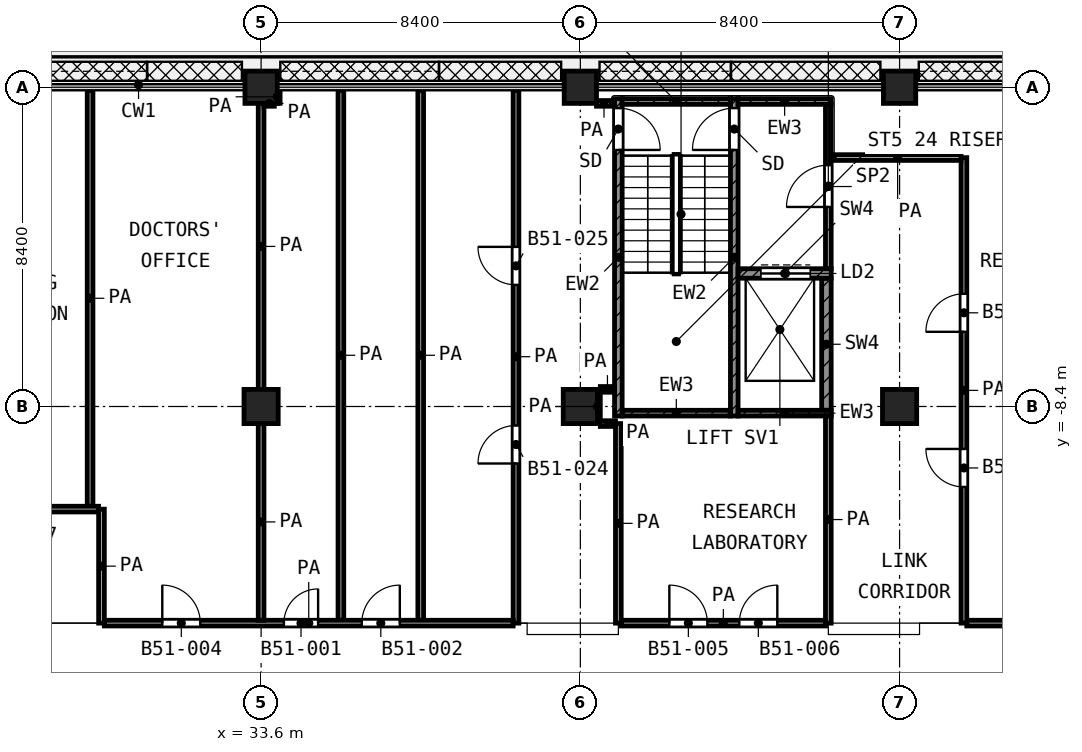
"""IFC4 building model, lengths in metres.
Left out: names, types, materials, properties, quantities, classifications, styles, units other than length and angle.
Written with IfcOpenShell. Run it as: python <this file> out.ifc"""

import sys

from ifc_helpers import new_model, si_unit, direction, frame, frame_2d, origin, origin_2d, place, context, subcontext, project, spatial, rectangle, extrude, element, fill, save


model = new_model("IFC4")
c1 = context("Model", 3, precision=1e-05, world=origin(), true_north=direction((0.0, 1.0)))
c2 = subcontext(c1, "Body", "Model", "MODEL_VIEW")
j1 = project(units=[si_unit("LENGTHUNIT", "METRE"), si_unit("PLANEANGLEUNIT", "RADIAN")], contexts=[c1])
p1 = place(None, origin())
s1 = spatial("IfcSite", under=j1, at=p1, CompositionType="ELEMENT")
p2 = place(p1, origin())
s2 = spatial("IfcBuilding", under=s1, at=p2, CompositionType="ELEMENT")
p3 = place(p2, frame((0.0, 0.0, 222.2)))
s3 = spatial("IfcBuildingStorey", under=s2, at=p3, CompositionType="ELEMENT", Elevation=222.2)
for number, where, z_axis, x_axis in (
    (1, (33.6, 0.0, 0.0), (0.0, 0.0, 1.0), (1.0, 0.0, 0.0)),
    (2, (42.0, 0.0, 0.0), (0.0, 0.0, 1.0), (1.0, 0.0, 0.0)),
    (3, (50.4, 0.0, 0.0), (0.0, 0.0, 1.0), (1.0, 0.0, 0.0)),
):
    element("IfcColumn", number, at=place(p3, frame(where, z_axis=z_axis, x_axis=x_axis)), inside=s3, PredefinedType="COLUMN", context=c2, shape_type="SweptSolid", body=[
        extrude(rectangle(XDim=0.85, YDim=0.85, at=origin_2d()), origin(), (0.0, 0.0, 1.0), 4.2),
    ])
for number, where, z_axis, x_axis in (
    (4, (33.6, -8.4, 0.0), (0.0, 0.0, 1.0), (1.0, 0.0, 0.0)),
    (5, (42.0, -8.4, 0.0), (0.0, 0.0, 1.0), (1.0, 0.0, 0.0)),
    (6, (50.4, -8.4, 0.0), (0.0, 0.0, 1.0), (1.0, 0.0, 0.0)),
):
    element("IfcColumn", number, at=place(p3, frame(where, z_axis=z_axis, x_axis=x_axis)), inside=s3, PredefinedType="COLUMN", context=c2, shape_type="SweptSolid", body=[
        extrude(rectangle(XDim=0.9, YDim=0.9, at=origin_2d()), origin(), (0.0, 0.0, 1.0), 4.2),
    ])
p4 = place(p3, frame((43.0, -8.65, 0.0), z_axis=(0.0, 0.0, 1.0), x_axis=(0.0, 1.0, 0.0)))
e7 = element("IfcWall", 7, at=p4, inside=s3, PredefinedType="SHEAR", context=c2, shape_type="SweptSolid", body=[
    extrude(rectangle(XDim=8.35, YDim=0.2, at=frame_2d((4.175, 0.0))), origin(), (0.0, 0.0, 1.0), 3.6),
])
p5 = place(p4, frame((7.0, 0.0, 0.0)))
e8 = element("IfcOpeningElement", 8, at=p5, cuts=e7, PredefinedType="OPENING", context=c2, shape_type="SweptSolid", body=[
    extrude(rectangle(XDim=1.1, YDim=2.1, at=frame_2d((0.55, 1.05))), frame((0.0, 0.11, 0.0), z_axis=(0.0, -1.0, 0.0), x_axis=(1.0, 0.0, 0.0)), (0.0, 0.0, 1.0), 0.22),
])
p6 = place(p3, frame((46.05, -8.65, 0.0), z_axis=(0.0, 0.0, 1.0), x_axis=(0.0, 1.0, 0.0)))
e9 = element("IfcWall", 9, at=p6, inside=s3, PredefinedType="SHEAR", context=c2, shape_type="SweptSolid", body=[
    extrude(rectangle(XDim=8.35, YDim=0.2, at=frame_2d((4.175, 0.0))), origin(), (0.0, 0.0, 1.0), 3.6),
])
p7 = place(p6, frame((7.0, 0.0, 0.0)))
e10 = element("IfcOpeningElement", 10, at=p7, cuts=e9, PredefinedType="OPENING", context=c2, shape_type="SweptSolid", body=[
    extrude(rectangle(XDim=1.1, YDim=2.1, at=frame_2d((0.55, 1.05))), frame((0.0, 0.11, 0.0), z_axis=(0.0, -1.0, 0.0), x_axis=(1.0, 0.0, 0.0)), (0.0, 0.0, 1.0), 0.22),
])
p8 = place(p3, frame((43.1, -0.375, 0.0), z_axis=(0.0, 0.0, 1.0), x_axis=(1.0, 0.0, 0.0)))
e11 = element("IfcWall", 11, at=p8, inside=s3, PredefinedType="SHEAR", context=c2, shape_type="SweptSolid", body=[
    extrude(rectangle(XDim=2.85, YDim=0.15, at=frame_2d((1.425, 0.0))), origin(), (0.0, 0.0, 1.0), 3.6),
])
p9 = place(p3, frame((46.15, -0.375, 0.0), z_axis=(0.0, 0.0, 1.0), x_axis=(1.0, 0.0, 0.0)))
e12 = element("IfcWall", 12, at=p9, inside=s3, PredefinedType="SHEAR", context=c2, shape_type="SweptSolid", body=[
    extrude(rectangle(XDim=2.45, YDim=0.15, at=frame_2d((1.225, 0.0))), origin(), (0.0, 0.0, 1.0), 3.6),
])
p10 = place(p3, frame((43.1, -8.575, 0.0), z_axis=(0.0, 0.0, 1.0), x_axis=(1.0, 0.0, 0.0)))
e13 = element("IfcWall", 13, at=p10, inside=s3, PredefinedType="SHEAR", context=c2, shape_type="SweptSolid", body=[
    extrude(rectangle(XDim=2.85, YDim=0.15, at=frame_2d((1.425, 0.0))), origin(), (0.0, 0.0, 1.0), 3.6),
])
p11 = place(p3, frame((46.15, -8.575, 0.0), z_axis=(0.0, 0.0, 1.0), x_axis=(1.0, 0.0, 0.0)))
e14 = element("IfcWall", 14, at=p11, inside=s3, PredefinedType="SHEAR", context=c2, shape_type="SweptSolid", body=[
    extrude(rectangle(XDim=2.45, YDim=0.15, at=frame_2d((1.225, 0.0))), origin(), (0.0, 0.0, 1.0), 3.6),
])
p12 = place(p3, frame((46.15, -4.9, 0.0), z_axis=(0.0, 0.0, 1.0), x_axis=(1.0, 0.0, 0.0)))
e15 = element("IfcWall", 15, at=p12, inside=s3, PredefinedType="SHEAR", context=c2, shape_type="SweptSolid", body=[
    extrude(rectangle(XDim=2.45, YDim=0.25, at=frame_2d((1.225, 0.0))), origin(), (0.0, 0.0, 1.0), 3.6),
])
p13 = place(p12, frame((0.6, 0.0, 0.0)))
e16 = element("IfcOpeningElement", 16, at=p13, cuts=e15, PredefinedType="OPENING", context=c2, shape_type="SweptSolid", body=[
    extrude(rectangle(XDim=1.3, YDim=2.1, at=frame_2d((0.65, 1.05))), frame((0.0, 0.135, 0.0), z_axis=(0.0, -1.0, 0.0), x_axis=(1.0, 0.0, 0.0)), (0.0, 0.0, 1.0), 0.27),
])
p14 = place(p3, frame((48.475, -8.5, 0.0), z_axis=(0.0, 0.0, 1.0), x_axis=(0.0, 1.0, 0.0)))
e17 = element("IfcWall", 17, at=p14, inside=s3, PredefinedType="SHEAR", context=c2, shape_type="SweptSolid", body=[
    extrude(rectangle(XDim=3.475, YDim=0.25, at=frame_2d((1.738, 0.0))), origin(), (0.0, 0.0, 1.0), 3.6),
])
p15 = place(p3, frame((48.525, -4.775, 0.0), z_axis=(0.0, 0.0, 1.0), x_axis=(0.0, 1.0, 0.0)))
e18 = element("IfcWall", 18, at=p15, inside=s3, PredefinedType="PARTITIONING", context=c2, shape_type="SweptSolid", body=[
    extrude(rectangle(XDim=4.325, YDim=0.15, at=frame_2d((2.163, 0.0))), origin(), (0.0, 0.0, 1.0), 3.6),
])
p16 = place(p15, frame((1.625, 0.0, 0.0)))
e19 = element("IfcOpeningElement", 19, at=p16, cuts=e18, PredefinedType="OPENING", context=c2, shape_type="SweptSolid", body=[
    extrude(rectangle(XDim=1.1, YDim=2.1, at=frame_2d((0.55, 1.05))), frame((0.0, 0.085, 0.0), z_axis=(0.0, -1.0, 0.0), x_axis=(1.0, 0.0, 0.0)), (0.0, 0.0, 1.0), 0.17),
])
p17 = place(p3, frame((29.475, -14.1, 0.0), z_axis=(0.0, 0.0, 1.0), x_axis=(1.0, 0.0, 0.0)))
e20 = element("IfcWall", 20, at=p17, inside=s3, PredefinedType="PARTITIONING", context=c2, shape_type="SweptSolid", body=[
    extrude(rectangle(XDim=10.757, YDim=0.15, at=frame_2d((5.378, 0.0))), origin(), (0.0, 0.0, 1.0), 3.6),
])
p18 = place(p17, frame((1.525, 0.0, 0.0)))
e21 = element("IfcOpeningElement", 21, at=p18, cuts=e20, PredefinedType="OPENING", context=c2, shape_type="SweptSolid", body=[
    extrude(rectangle(XDim=1.0, YDim=2.1, at=frame_2d((0.5, 1.05))), frame((0.0, 0.085, 0.0), z_axis=(0.0, -1.0, 0.0), x_axis=(1.0, 0.0, 0.0)), (0.0, 0.0, 1.0), 0.17),
])
p19 = place(p17, frame((4.725, 0.0, 0.0)))
e22 = element("IfcOpeningElement", 22, at=p19, cuts=e20, PredefinedType="OPENING", context=c2, shape_type="SweptSolid", body=[
    extrude(rectangle(XDim=0.9, YDim=2.1, at=frame_2d((0.45, 1.05))), frame((0.0, 0.085, 0.0), z_axis=(0.0, -1.0, 0.0), x_axis=(1.0, 0.0, 0.0)), (0.0, 0.0, 1.0), 0.17),
])
p20 = place(p17, frame((6.775, 0.0, 0.0)))
e23 = element("IfcOpeningElement", 23, at=p20, cuts=e20, PredefinedType="OPENING", context=c2, shape_type="SweptSolid", body=[
    extrude(rectangle(XDim=1.0, YDim=2.1, at=frame_2d((0.5, 1.05))), frame((0.0, 0.085, 0.0), z_axis=(0.0, -1.0, 0.0), x_axis=(1.0, 0.0, 0.0)), (0.0, 0.0, 1.0), 0.17),
])
p21 = place(p3, frame((43.075, -14.1, 0.0), z_axis=(0.0, 0.0, 1.0), x_axis=(1.0, 0.0, 0.0)))
e24 = element("IfcWall", 24, at=p21, inside=s3, PredefinedType="PARTITIONING", context=c2, shape_type="SweptSolid", body=[
    extrude(rectangle(XDim=5.375, YDim=0.15, at=frame_2d((2.688, 0.0))), origin(), (0.0, 0.0, 1.0), 3.6),
])
p22 = place(p21, frame((1.267, 0.0, 0.0)))
e25 = element("IfcOpeningElement", 25, at=p22, cuts=e24, PredefinedType="OPENING", context=c2, shape_type="SweptSolid", body=[
    extrude(rectangle(XDim=1.0, YDim=2.1, at=frame_2d((0.5, 1.05))), frame((0.0, 0.085, 0.0), z_axis=(0.0, -1.0, 0.0), x_axis=(1.0, 0.0, 0.0)), (0.0, 0.0, 1.0), 0.17),
])
p23 = place(p21, frame((3.108, 0.0, 0.0)))
e26 = element("IfcOpeningElement", 26, at=p23, cuts=e24, PredefinedType="OPENING", context=c2, shape_type="SweptSolid", body=[
    extrude(rectangle(XDim=1.0, YDim=2.1, at=frame_2d((0.5, 1.05))), frame((0.0, 0.085, 0.0), z_axis=(0.0, -1.0, 0.0), x_axis=(1.0, 0.0, 0.0)), (0.0, 0.0, 1.0), 0.17),
])
p24 = place(p3, frame((52.168, -14.1, 0.0), z_axis=(0.0, 0.0, 1.0), x_axis=(1.0, 0.0, 0.0)))
e27 = element("IfcWall", 27, at=p24, inside=s3, PredefinedType="PARTITIONING", context=c2, shape_type="SweptSolid", body=[
    extrude(rectangle(XDim=14.952, YDim=0.15, at=frame_2d((7.476, 0.0))), origin(), (0.0, 0.0, 1.0), 2.7),
])
p25 = place(p24, frame((8.932, 0.0, 0.0)))
e28 = element("IfcOpeningElement", 28, at=p25, cuts=e27, PredefinedType="OPENING", context=c2, shape_type="SweptSolid", body=[
    extrude(rectangle(XDim=1.0, YDim=2.1, at=frame_2d((0.5, 1.05))), frame((0.0, 0.085, 0.0), z_axis=(0.0, -1.0, 0.0), x_axis=(1.0, 0.0, 0.0)), (0.0, 0.0, 1.0), 0.17),
])
p26 = place(p24, frame((11.732, 0.0, 0.0)))
e29 = element("IfcOpeningElement", 29, at=p26, cuts=e27, PredefinedType="OPENING", context=c2, shape_type="SweptSolid", body=[
    extrude(rectangle(XDim=1.0, YDim=2.1, at=frame_2d((0.5, 1.05))), frame((0.0, 0.085, 0.0), z_axis=(0.0, -1.0, 0.0), x_axis=(1.0, 0.0, 0.0)), (0.0, 0.0, 1.0), 0.17),
])
p27 = place(p3, frame((24.8, -11.1, 0.0), z_axis=(0.0, 0.0, 1.0), x_axis=(1.0, 0.0, 0.0)))
e30 = element("IfcWall", 30, at=p27, inside=s3, PredefinedType="PARTITIONING", context=c2, shape_type="SweptSolid", body=[
    extrude(rectangle(XDim=4.523, YDim=0.15, at=frame_2d((2.261, 0.0))), origin(), (0.0, 0.0, 1.0), 3.6),
])
p28 = place(p27, frame((1.75, 0.0, 0.0)))
e31 = element("IfcOpeningElement", 31, at=p28, cuts=e30, PredefinedType="OPENING", context=c2, shape_type="SweptSolid", body=[
    extrude(rectangle(XDim=1.2, YDim=2.1, at=frame_2d((0.6, 1.05))), frame((0.0, 0.085, 0.0), z_axis=(0.0, -1.0, 0.0), x_axis=(1.0, 0.0, 0.0)), (0.0, 0.0, 1.0), 0.17),
])
p29 = place(p3, frame((42.525, -8.85, 0.0), z_axis=(0.0, 0.0, 1.0), x_axis=(1.0, 0.0, 0.0)))
e32 = element("IfcWall", 32, at=p29, inside=s3, PredefinedType="PARTITIONING", context=c2, shape_type="SweptSolid", body=[
    extrude(rectangle(XDim=0.4, YDim=0.15, at=frame_2d((0.2, 0.0))), origin(), (0.0, 0.0, 1.0), 3.6),
])
p30 = place(p3, frame((42.526, -7.95, 0.0), z_axis=(0.0, 0.0, 1.0), x_axis=(1.0, 0.0, 0.0)))
e33 = element("IfcWall", 33, at=p30, inside=s3, PredefinedType="PARTITIONING", context=c2, shape_type="SweptSolid", body=[
    extrude(rectangle(XDim=0.374, YDim=0.15, at=frame_2d((0.187, 0.0))), origin(), (0.0, 0.0, 1.0), 3.6),
])
p31 = place(p3, frame((48.68, -1.85, 0.0), z_axis=(0.0, 0.0, 1.0), x_axis=(1.0, 0.0, 0.0)))
e34 = element("IfcWall", 34, at=p31, inside=s3, PredefinedType="PARTITIONING", context=c2, shape_type="SweptSolid", body=[
    extrude(rectangle(XDim=3.337, YDim=0.15, at=frame_2d((1.668, 0.0))), origin(), (0.0, 0.0, 1.0), 3.6),
])
p32 = place(p3, frame((33.677, -0.425, 0.0), z_axis=(0.0, 0.0, 1.0), x_axis=(1.0, 0.0, 0.0)))
e35 = element("IfcWall", 35, at=p32, inside=s3, PredefinedType="PARTITIONING", context=c2, shape_type="SweptSolid", body=[
    extrude(rectangle(XDim=0.271, YDim=0.15, at=frame_2d((0.135, 0.0))), origin(), (0.0, 0.0, 1.0), 3.6),
])
p33 = place(p3, frame((42.425, -0.425, 0.0), z_axis=(0.0, 0.0, 1.0), x_axis=(1.0, 0.0, 0.0)))
e36 = element("IfcWall", 36, at=p33, inside=s3, PredefinedType="PARTITIONING", context=c2, shape_type="SweptSolid", body=[
    extrude(rectangle(XDim=0.395, YDim=0.15, at=frame_2d((0.198, 0.0))), origin(), (0.0, 0.0, 1.0), 3.6),
])
p34 = place(p3, frame((29.1, -11.025, 0.0), z_axis=(0.0, 0.0, 1.0), x_axis=(0.0, 1.0, 0.0)))
e37 = element("IfcWall", 37, at=p34, inside=s3, PredefinedType="PARTITIONING", context=c2, shape_type="SweptSolid", body=[
    extrude(rectangle(XDim=10.945, YDim=0.15, at=frame_2d((5.472, 0.0))), origin(), (0.0, 0.0, 1.0), 3.6),
])
p35 = place(p3, frame((29.4, -14.1, 0.0), z_axis=(0.0, 0.0, 1.0), x_axis=(0.0, 1.0, 0.0)))
e38 = element("IfcWall", 38, at=p35, inside=s3, PredefinedType="PARTITIONING", context=c2, shape_type="SweptSolid", body=[
    extrude(rectangle(XDim=2.998, YDim=0.15, at=frame_2d((1.499, 0.0))), origin(), (0.0, 0.0, 1.0), 3.6),
])
p36 = place(p3, frame((33.6, -14.025, 0.0), z_axis=(0.0, 0.0, 1.0), x_axis=(0.0, 1.0, 0.0)))
e39 = element("IfcWall", 39, at=p36, inside=s3, PredefinedType="PARTITIONING", context=c2, shape_type="SweptSolid", body=[
    extrude(rectangle(XDim=5.175, YDim=0.15, at=frame_2d((2.587, 0.0))), origin(), (0.0, 0.0, 1.0), 3.6),
])
p37 = place(p3, frame((33.6, -7.95, 0.0), z_axis=(0.0, 0.0, 1.0), x_axis=(0.0, 1.0, 0.0)))
e40 = element("IfcWall", 40, at=p37, inside=s3, PredefinedType="PARTITIONING", context=c2, shape_type="SweptSolid", body=[
    extrude(rectangle(XDim=7.523, YDim=0.15, at=frame_2d((3.761, 0.0))), origin(), (0.0, 0.0, 1.0), 3.6),
])
p38 = place(p3, frame((34.025, -0.423, 0.0), z_axis=(0.0, 0.0, 1.0), x_axis=(0.0, 1.0, 0.0)))
e41 = element("IfcWall", 41, at=p38, inside=s3, PredefinedType="PARTITIONING", context=c2, shape_type="SweptSolid", body=[
    extrude(rectangle(XDim=0.343, YDim=0.15, at=frame_2d((0.171, 0.0))), origin(), (0.0, 0.0, 1.0), 3.6),
])
for number, where, z_axis, x_axis in (
    (42, (35.7, -14.025, 0.0), (0.0, 0.0, 1.0), (0.0, 1.0, 0.0)),
    (43, (37.8, -14.025, 0.0), (0.0, 0.0, 1.0), (0.0, 1.0, 0.0)),
):
    element("IfcWall", number, at=place(p3, frame(where, z_axis=z_axis, x_axis=x_axis)), inside=s3, PredefinedType="PARTITIONING", context=c2, shape_type="SweptSolid", body=[
        extrude(rectangle(XDim=13.945, YDim=0.15, at=frame_2d((6.972, 0.0))), origin(), (0.0, 0.0, 1.0), 3.6),
    ])
p39 = place(p3, frame((40.307, -14.1, 0.0), z_axis=(0.0, 0.0, 1.0), x_axis=(0.0, 1.0, 0.0)))
e44 = element("IfcWall", 44, at=p39, inside=s3, PredefinedType="PARTITIONING", context=c2, shape_type="SweptSolid", body=[
    extrude(rectangle(XDim=14.02, YDim=0.15, at=frame_2d((7.01, 0.0))), origin(), (0.0, 0.0, 1.0), 3.6),
])
p40 = place(p39, frame((4.2, 0.0, 0.0)))
e45 = element("IfcOpeningElement", 45, at=p40, cuts=e44, PredefinedType="OPENING", context=c2, shape_type="SweptSolid", body=[
    extrude(rectangle(XDim=1.0, YDim=2.1, at=frame_2d((0.5, 1.05))), frame((0.0, 0.085, 0.0), z_axis=(0.0, -1.0, 0.0), x_axis=(1.0, 0.0, 0.0)), (0.0, 0.0, 1.0), 0.17),
])
p41 = place(p39, frame((8.9, 0.0, 0.0)))
e46 = element("IfcOpeningElement", 46, at=p41, cuts=e44, PredefinedType="OPENING", context=c2, shape_type="SweptSolid", body=[
    extrude(rectangle(XDim=1.0, YDim=2.1, at=frame_2d((0.5, 1.05))), frame((0.0, 0.085, 0.0), z_axis=(0.0, -1.0, 0.0), x_axis=(1.0, 0.0, 0.0)), (0.0, 0.0, 1.0), 0.17),
])
p42 = place(p3, frame((42.45, -8.85, 0.0), z_axis=(0.0, 0.0, 1.0), x_axis=(0.0, 1.0, 0.0)))
e47 = element("IfcWall", 47, at=p42, inside=s3, PredefinedType="PARTITIONING", context=c2, shape_type="SweptSolid", body=[
    extrude(rectangle(XDim=0.899, YDim=0.15, at=frame_2d((0.45, 0.0))), origin(), (0.0, 0.0, 1.0), 3.6),
])
p43 = place(p3, frame((43.0, -14.1, 0.0), z_axis=(0.0, 0.0, 1.0), x_axis=(0.0, 1.0, 0.0)))
e48 = element("IfcWall", 48, at=p43, inside=s3, PredefinedType="PARTITIONING", context=c2, shape_type="SweptSolid", body=[
    extrude(rectangle(XDim=5.25, YDim=0.15, at=frame_2d((2.625, 0.0))), origin(), (0.0, 0.0, 1.0), 3.6),
])
p44 = place(p3, frame((48.525, -14.1, 0.0), z_axis=(0.0, 0.0, 1.0), x_axis=(0.0, 1.0, 0.0)))
e49 = element("IfcWall", 49, at=p44, inside=s3, PredefinedType="PARTITIONING", context=c2, shape_type="SweptSolid", body=[
    extrude(rectangle(XDim=5.45, YDim=0.15, at=frame_2d((2.725, 0.0))), origin(), (0.0, 0.0, 1.0), 3.6),
])
p45 = place(p3, frame((52.093, -14.1, 0.0), z_axis=(0.0, 0.0, 1.0), x_axis=(0.0, 1.0, 0.0)))
e50 = element("IfcWall", 50, at=p45, inside=s3, PredefinedType="PARTITIONING", context=c2, shape_type="SweptSolid", body=[
    extrude(rectangle(XDim=12.248, YDim=0.15, at=frame_2d((6.124, 0.0))), origin(), (0.0, 0.0, 1.0), 3.6),
])
p46 = place(p45, frame((7.665, 0.0, 0.0)))
e51 = element("IfcOpeningElement", 51, at=p46, cuts=e50, PredefinedType="OPENING", context=c2, shape_type="SweptSolid", body=[
    extrude(rectangle(XDim=1.0, YDim=2.1, at=frame_2d((0.5, 1.05))), frame((0.0, 0.085, 0.0), z_axis=(0.0, -1.0, 0.0), x_axis=(1.0, 0.0, 0.0)), (0.0, 0.0, 1.0), 0.17),
])
p47 = place(p45, frame((3.583, 0.0, 0.0)))
e52 = element("IfcOpeningElement", 52, at=p47, cuts=e50, PredefinedType="OPENING", context=c2, shape_type="SweptSolid", body=[
    extrude(rectangle(XDim=1.0, YDim=2.1, at=frame_2d((0.5, 1.05))), frame((0.0, 0.085, 0.0), z_axis=(0.0, -1.0, 0.0), x_axis=(1.0, 0.0, 0.0)), (0.0, 0.0, 1.0), 0.17),
])
p48 = place(p5, frame((1.1, 0.0, 0.0), z_axis=(0.0, 0.0, 1.0), x_axis=(-1.0, 0.0, 0.0)))
e53 = element("IfcDoor", 53, at=p48, inside=s3, OperationType="SINGLE_SWING_LEFT", PredefinedType="DOOR", context=c2, shape_type="SweptSolid", body=[
    extrude(rectangle(XDim=1.1, YDim=2.1, at=frame_2d((0.55, 1.05))), frame((0.0, 0.025, 0.0), z_axis=(0.0, -1.0, 0.0), x_axis=(1.0, 0.0, 0.0)), (0.0, 0.0, 1.0), 0.05),
])
fill(e8, e53)
p49 = place(p7, origin())
e54 = element("IfcDoor", 54, at=p49, inside=s3, OperationType="SINGLE_SWING_LEFT", PredefinedType="DOOR", context=c2, shape_type="SweptSolid", body=[
    extrude(rectangle(XDim=1.1, YDim=2.1, at=frame_2d((0.55, 1.05))), frame((0.0, 0.025, 0.0), z_axis=(0.0, -1.0, 0.0), x_axis=(1.0, 0.0, 0.0)), (0.0, 0.0, 1.0), 0.05),
])
fill(e10, e54)
p50 = place(p13, origin())
e55 = element("IfcDoor", 55, at=p50, inside=s3, OperationType="DOUBLE_DOOR_SLIDING", PredefinedType="DOOR", context=c2, shape_type="SweptSolid", body=[
    extrude(rectangle(XDim=1.3, YDim=2.1, at=frame_2d((0.65, 1.05))), frame((0.0, 0.025, 0.0), z_axis=(0.0, -1.0, 0.0), x_axis=(1.0, 0.0, 0.0)), (0.0, 0.0, 1.0), 0.05),
])
fill(e16, e55)
p51 = place(p16, origin())
e56 = element("IfcDoor", 56, at=p51, inside=s3, OperationType="SINGLE_SWING_LEFT", PredefinedType="DOOR", context=c2, shape_type="SweptSolid", body=[
    extrude(rectangle(XDim=1.1, YDim=2.1, at=frame_2d((0.55, 1.05))), frame((0.0, 0.025, 0.0), z_axis=(0.0, -1.0, 0.0), x_axis=(1.0, 0.0, 0.0)), (0.0, 0.0, 1.0), 0.05),
])
fill(e19, e56)
p52 = place(p18, origin())
e57 = element("IfcDoor", 57, at=p52, inside=s3, OperationType="SINGLE_SWING_LEFT", PredefinedType="DOOR", context=c2, shape_type="SweptSolid", body=[
    extrude(rectangle(XDim=1.0, YDim=2.1, at=frame_2d((0.5, 1.05))), frame((0.0, 0.025, 0.0), z_axis=(0.0, -1.0, 0.0), x_axis=(1.0, 0.0, 0.0)), (0.0, 0.0, 1.0), 0.05),
])
fill(e21, e57)
p53 = place(p22, origin())
e58 = element("IfcDoor", 58, at=p53, inside=s3, OperationType="SINGLE_SWING_LEFT", PredefinedType="DOOR", context=c2, shape_type="SweptSolid", body=[
    extrude(rectangle(XDim=1.0, YDim=2.1, at=frame_2d((0.5, 1.05))), frame((0.0, 0.025, 0.0), z_axis=(0.0, -1.0, 0.0), x_axis=(1.0, 0.0, 0.0)), (0.0, 0.0, 1.0), 0.05),
])
fill(e25, e58)
p54 = place(p23, origin())
e59 = element("IfcDoor", 59, at=p54, inside=s3, OperationType="SINGLE_SWING_RIGHT", PredefinedType="DOOR", context=c2, shape_type="SweptSolid", body=[
    extrude(rectangle(XDim=1.0, YDim=2.1, at=frame_2d((0.5, 1.05))), frame((0.0, 0.025, 0.0), z_axis=(0.0, -1.0, 0.0), x_axis=(1.0, 0.0, 0.0)), (0.0, 0.0, 1.0), 0.05),
])
fill(e26, e59)
p55 = place(p46, origin())
e60 = element("IfcDoor", 60, at=p55, inside=s3, OperationType="SINGLE_SWING_LEFT", PredefinedType="DOOR", context=c2, shape_type="SweptSolid", body=[
    extrude(rectangle(XDim=1.0, YDim=2.1, at=frame_2d((0.5, 1.05))), frame((0.0, 0.025, 0.0), z_axis=(0.0, -1.0, 0.0), x_axis=(1.0, 0.0, 0.0)), (0.0, 0.0, 1.0), 0.05),
])
fill(e51, e60)
p56 = place(p47, origin())
e61 = element("IfcDoor", 61, at=p56, inside=s3, OperationType="SINGLE_SWING_RIGHT", PredefinedType="DOOR", context=c2, shape_type="SweptSolid", body=[
    extrude(rectangle(XDim=1.0, YDim=2.1, at=frame_2d((0.5, 1.05))), frame((0.0, 0.025, 0.0), z_axis=(0.0, -1.0, 0.0), x_axis=(1.0, 0.0, 0.0)), (0.0, 0.0, 1.0), 0.05),
])
fill(e52, e61)
p57 = place(p19, origin())
e62 = element("IfcDoor", 62, at=p57, inside=s3, OperationType="SINGLE_SWING_RIGHT", PredefinedType="DOOR", context=c2, shape_type="SweptSolid", body=[
    extrude(rectangle(XDim=0.9, YDim=2.1, at=frame_2d((0.45, 1.05))), frame((0.0, 0.025, 0.0), z_axis=(0.0, -1.0, 0.0), x_axis=(1.0, 0.0, 0.0)), (0.0, 0.0, 1.0), 0.05),
])
fill(e22, e62)
p58 = place(p20, origin())
e63 = element("IfcDoor", 63, at=p58, inside=s3, OperationType="SINGLE_SWING_RIGHT", PredefinedType="DOOR", context=c2, shape_type="SweptSolid", body=[
    extrude(rectangle(XDim=1.0, YDim=2.1, at=frame_2d((0.5, 1.05))), frame((0.0, 0.025, 0.0), z_axis=(0.0, -1.0, 0.0), x_axis=(1.0, 0.0, 0.0)), (0.0, 0.0, 1.0), 0.05),
])
fill(e23, e63)
p59 = place(p40, origin())
e64 = element("IfcDoor", 64, at=p59, inside=s3, OperationType="SINGLE_SWING_LEFT", PredefinedType="DOOR", context=c2, shape_type="SweptSolid", body=[
    extrude(rectangle(XDim=1.0, YDim=2.1, at=frame_2d((0.5, 1.05))), frame((0.0, 0.025, 0.0), z_axis=(0.0, -1.0, 0.0), x_axis=(1.0, 0.0, 0.0)), (0.0, 0.0, 1.0), 0.05),
])
fill(e45, e64)
p60 = place(p41, origin())
e65 = element("IfcDoor", 65, at=p60, inside=s3, OperationType="SINGLE_SWING_RIGHT", PredefinedType="DOOR", context=c2, shape_type="SweptSolid", body=[
    extrude(rectangle(XDim=1.0, YDim=2.1, at=frame_2d((0.5, 1.05))), frame((0.0, 0.025, 0.0), z_axis=(0.0, -1.0, 0.0), x_axis=(1.0, 0.0, 0.0)), (0.0, 0.0, 1.0), 0.05),
])
fill(e46, e65)
save(model, sys.argv[1])
